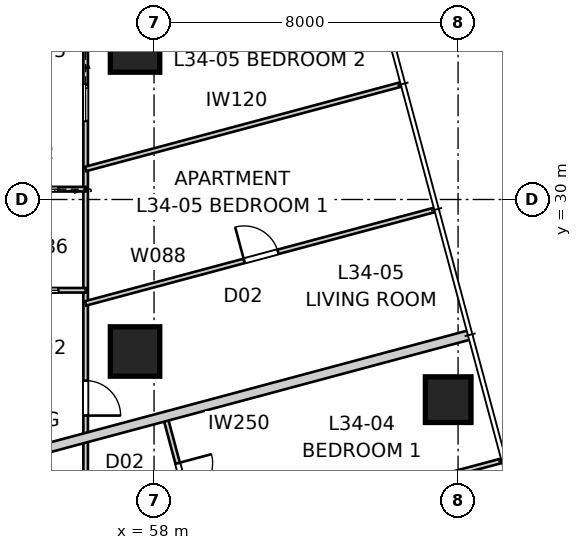
"""IFC4 building model, lengths in metres.
Left out: names, types, materials, properties, quantities, classifications, styles, units other than length and angle.
Written with IfcOpenShell. Run it as: python <this file> out.ifc"""

import sys

from ifc_helpers import new_model, si_unit, direction, frame, frame_2d, origin, origin_2d, place, context, subcontext, project, spatial, rectangle, extrude, element, fill, save


model = new_model("IFC4")
c1 = context("Model", 3, precision=1e-05, world=origin(), true_north=direction((0.0, 1.0)))
c2 = subcontext(c1, "Body", "Model", "MODEL_VIEW")
j1 = project(units=[si_unit("LENGTHUNIT", "METRE"), si_unit("PLANEANGLEUNIT", "RADIAN")], contexts=[c1])
p1 = place(None, origin())
s1 = spatial("IfcSite", under=j1, at=p1, CompositionType="ELEMENT")
p2 = place(p1, origin())
s2 = spatial("IfcBuilding", under=s1, at=p2, CompositionType="ELEMENT")
p3 = place(p2, frame((0.0, 0.0, 125.2)))
s3 = spatial("IfcBuildingStorey", under=s2, at=p3, CompositionType="ELEMENT", Elevation=125.2)
p4 = place(p3, frame((65.74, 24.733, 0.0), z_axis=(0.0, 0.0, 1.0), x_axis=(1.0, 0.0, 0.0)))
e1 = element("IfcColumn", 1, at=p4, inside=s3, PredefinedType="COLUMN", context=c2, shape_type="SweptSolid", body=[
    extrude(rectangle(XDim=1.2, YDim=1.2, at=origin_2d()), origin(), (0.0, 0.0, 1.0), 3.4),
])
for number, where, z_axis, x_axis in (
    (2, (57.5, 26.0, 0.0), (0.0, 0.0, 1.0), (1.0, 0.0, 0.0)),
    (3, (57.5, 34.0, 0.0), (0.0, 0.0, 1.0), (1.0, 0.0, 0.0)),
):
    element("IfcColumn", number, at=place(p3, frame(where, z_axis=z_axis, x_axis=x_axis)), inside=s3, PredefinedType="COLUMN", context=c2, shape_type="SweptSolid", body=[
        extrude(rectangle(XDim=1.3, YDim=1.3, at=origin_2d()), origin(), (0.0, 0.0, 1.0), 3.4),
    ])
p5 = place(p3, frame((63.665, 36.341, 0.0), z_axis=(0.0, 0.0, 1.0), x_axis=(-0.965927365002, -0.258813302479, 0.0)))
e4 = element("IfcWall", 4, at=p5, inside=s3, PredefinedType="PARTITIONING", context=c2, shape_type="SweptSolid", body=[
    extrude(rectangle(XDim=10.22, YDim=0.25, at=frame_2d((5.11, 0.0))), origin(), (0.0, 0.0, 1.0), 3.25),
])
p6 = place(p3, frame((66.318, 26.44, 0.0), z_axis=(0.0, 0.0, 1.0), x_axis=(-0.965924854576, -0.258822671559, 0.0)))
e5 = element("IfcWall", 5, at=p6, inside=s3, PredefinedType="PARTITIONING", context=c2, shape_type="SweptSolid", body=[
    extrude(rectangle(XDim=12.966, YDim=0.25, at=frame_2d((6.483, 0.0))), origin(), (0.0, 0.0, 1.0), 3.25),
])
p7 = place(p3, frame((56.2, 46.2, 0.0), z_axis=(0.0, 0.0, 1.0), x_axis=(0.0, -1.0, 0.0)))
e6 = element("IfcWall", 6, at=p7, inside=s3, PredefinedType="PARTITIONING", context=c2, shape_type="SweptSolid", body=[
    extrude(rectangle(XDim=33.2, YDim=0.12, at=frame_2d((16.6, 0.0))), origin(), (0.0, 0.0, 1.0), 2.55),
])
p8 = place(p7, frame((23.955, 0.0, 0.0)))
e7 = element("IfcOpeningElement", 7, at=p8, cuts=e6, PredefinedType="OPENING", context=c2, shape_type="SweptSolid", body=[
    extrude(rectangle(XDim=0.92, YDim=2.34, at=frame_2d((0.46, 1.17))), frame((0.0, 0.07, 0.0), z_axis=(0.0, -1.0, 0.0), x_axis=(1.0, 0.0, 0.0)), (0.0, 0.0, 1.0), 0.14),
])
p9 = place(p7, frame((20.966, 0.0, 0.0)))
e8 = element("IfcOpeningElement", 8, at=p9, cuts=e6, PredefinedType="OPENING", context=c2, shape_type="SweptSolid", body=[
    extrude(rectangle(XDim=0.92, YDim=2.34, at=frame_2d((0.46, 1.17))), frame((0.0, 0.07, 0.0), z_axis=(0.0, -1.0, 0.0), x_axis=(1.0, 0.0, 0.0)), (0.0, 0.0, 1.0), 0.14),
])
p10 = place(p7, frame((13.174, 0.0, 0.0)))
e9 = element("IfcOpeningElement", 9, at=p10, cuts=e6, PredefinedType="OPENING", context=c2, shape_type="SweptSolid", body=[
    extrude(rectangle(XDim=0.96, YDim=2.1, at=frame_2d((0.48, 1.05))), frame((0.0, 0.07, 0.0), z_axis=(0.0, -1.0, 0.0), x_axis=(1.0, 0.0, 0.0)), (0.0, 0.0, 1.0), 0.14),
])
p11 = place(p3, frame((58.292, 24.29, 0.0), z_axis=(0.0, 0.0, 1.0), x_axis=(0.258809899302, -0.965928276853, 0.0)))
e10 = element("IfcWall", 10, at=p11, inside=s3, PredefinedType="PARTITIONING", context=c2, shape_type="SweptSolid", body=[
    extrude(rectangle(XDim=6.833, YDim=0.12, at=frame_2d((3.417, 0.0))), origin(), (0.0, 0.0, 1.0), 3.25),
])
p12 = place(p11, frame((1.273, 0.0, 0.0)))
e11 = element("IfcOpeningElement", 11, at=p12, cuts=e10, PredefinedType="OPENING", context=c2, shape_type="SweptSolid", body=[
    extrude(rectangle(XDim=0.92, YDim=2.34, at=frame_2d((0.46, 1.17))), frame((0.0, 0.07, 0.0), z_axis=(0.0, -1.0, 0.0), x_axis=(1.0, 0.0, 0.0)), (0.0, 0.0, 1.0), 0.14),
])
p13 = place(p11, frame((4.64, 0.0, 0.0)))
e12 = element("IfcOpeningElement", 12, at=p13, cuts=e10, PredefinedType="OPENING", context=c2, shape_type="SweptSolid", body=[
    extrude(rectangle(XDim=0.92, YDim=2.34, at=frame_2d((0.46, 1.17))), frame((0.0, 0.07, 0.0), z_axis=(0.0, -1.0, 0.0), x_axis=(1.0, 0.0, 0.0)), (0.0, 0.0, 1.0), 0.14),
])
p14 = place(p3, frame((67.164, 23.13, 0.0), z_axis=(0.0, 0.0, 1.0), x_axis=(-0.965929470378, -0.258805444794, 0.0)))
e13 = element("IfcWall", 13, at=p14, inside=s3, PredefinedType="PARTITIONING", context=c2, shape_type="SweptSolid", body=[
    extrude(rectangle(XDim=8.269, YDim=0.12, at=frame_2d((4.135, 0.0))), origin(), (0.0, 0.0, 1.0), 2.722),
])
p15 = place(p3, frame((53.8, 27.611, 0.0), z_axis=(0.0, 0.0, 1.0), x_axis=(1.0, 0.0, 0.0)))
e14 = element("IfcWall", 14, at=p15, inside=s3, PredefinedType="PARTITIONING", context=c2, shape_type="SweptSolid", body=[
    extrude(rectangle(XDim=2.4, YDim=0.12, at=frame_2d((1.2, 0.0))), origin(), (0.0, 0.0, 1.0), 3.25),
])
p16 = place(p15, frame((0.72, 0.0, 0.0)))
e15 = element("IfcOpeningElement", 15, at=p16, cuts=e14, PredefinedType="OPENING", context=c2, shape_type="SweptSolid", body=[
    extrude(rectangle(XDim=0.96, YDim=2.1, at=frame_2d((0.48, 1.05))), frame((0.0, 0.07, 0.0), z_axis=(0.0, -1.0, 0.0), x_axis=(1.0, 0.0, 0.0)), (0.0, 0.0, 1.0), 0.14),
])
p17 = place(p3, frame((56.2, 30.272, 0.0), z_axis=(0.0, 0.0, 1.0), x_axis=(-1.0, 0.0, 0.0)))
e16 = element("IfcWall", 16, at=p17, inside=s3, PredefinedType="PARTITIONING", context=c2, shape_type="SweptSolid", body=[
    extrude(rectangle(XDim=2.4, YDim=0.12, at=frame_2d((1.2, 0.0))), origin(), (0.0, 0.0, 1.0), 3.25),
])
p18 = place(p17, frame((0.72, 0.0, 0.0)))
e17 = element("IfcOpeningElement", 17, at=p18, cuts=e16, PredefinedType="OPENING", context=c2, shape_type="SweptSolid", body=[
    extrude(rectangle(XDim=0.96, YDim=2.1, at=frame_2d((0.48, 1.05))), frame((0.0, 0.07, 0.0), z_axis=(0.0, -1.0, 0.0), x_axis=(1.0, 0.0, 0.0)), (0.0, 0.0, 1.0), 0.14),
])
p19 = place(p3, frame((56.2, 27.266, 0.0), z_axis=(0.0, 0.0, 1.0), x_axis=(0.965926072385, 0.25881812666, 0.0)))
e18 = element("IfcWall", 18, at=p19, inside=s3, PredefinedType="PARTITIONING", context=c2, shape_type="SweptSolid", body=[
    extrude(rectangle(XDim=9.52, YDim=0.12, at=frame_2d((4.76, 0.0))), origin(), (0.0, 0.0, 1.0), 3.25),
])
p20 = place(p19, frame((4.32, 0.0, 0.0)))
e19 = element("IfcOpeningElement", 19, at=p20, cuts=e18, PredefinedType="OPENING", context=c2, shape_type="SweptSolid", body=[
    extrude(rectangle(XDim=0.92, YDim=2.34, at=frame_2d((0.46, 1.17))), frame((0.0, 0.07, 0.0), z_axis=(0.0, -1.0, 0.0), x_axis=(1.0, 0.0, 0.0)), (0.0, 0.0, 1.0), 0.14),
])
p21 = place(p3, frame((56.2, 30.803, 0.0), z_axis=(0.0, 0.0, 1.0), x_axis=(0.965920565748, 0.258838676912, 0.0)))
e20 = element("IfcWall", 20, at=p21, inside=s3, PredefinedType="PARTITIONING", context=c2, shape_type="SweptSolid", body=[
    extrude(rectangle(XDim=8.604, YDim=0.12, at=frame_2d((4.302, 0.0))), origin(), (0.0, 0.0, 1.0), 3.25),
])
p22 = place(p9, origin())
e21 = element("IfcDoor", 21, at=p22, inside=s3, OperationType="SINGLE_SWING_RIGHT", PredefinedType="DOOR", context=c2, shape_type="SweptSolid", body=[
    extrude(rectangle(XDim=0.92, YDim=2.34, at=frame_2d((0.46, 1.17))), frame((0.0, 0.025, 0.0), z_axis=(0.0, -1.0, 0.0), x_axis=(1.0, 0.0, 0.0)), (0.0, 0.0, 1.0), 0.05),
])
fill(e8, e21)
p23 = place(p16, origin())
e22 = element("IfcDoor", 22, at=p23, inside=s3, OperationType="SLIDING_TO_LEFT", PredefinedType="DOOR", context=c2, shape_type="SweptSolid", body=[
    extrude(rectangle(XDim=0.96, YDim=2.1, at=frame_2d((0.48, 1.05))), frame((0.0, 0.025, 0.0), z_axis=(0.0, -1.0, 0.0), x_axis=(1.0, 0.0, 0.0)), (0.0, 0.0, 1.0), 0.05),
])
fill(e15, e22)
p24 = place(p12, origin())
e23 = element("IfcDoor", 23, at=p24, inside=s3, OperationType="SINGLE_SWING_LEFT", PredefinedType="DOOR", context=c2, shape_type="SweptSolid", body=[
    extrude(rectangle(XDim=0.92, YDim=2.34, at=frame_2d((0.46, 1.17))), frame((0.0, 0.025, 0.0), z_axis=(0.0, -1.0, 0.0), x_axis=(1.0, 0.0, 0.0)), (0.0, 0.0, 1.0), 0.05),
])
fill(e11, e23)
p25 = place(p20, origin())
e24 = element("IfcDoor", 24, at=p25, inside=s3, OperationType="SINGLE_SWING_LEFT", PredefinedType="DOOR", context=c2, shape_type="SweptSolid", body=[
    extrude(rectangle(XDim=0.92, YDim=2.34, at=frame_2d((0.46, 1.17))), frame((0.0, 0.025, 0.0), z_axis=(0.0, -1.0, 0.0), x_axis=(1.0, 0.0, 0.0)), (0.0, 0.0, 1.0), 0.05),
])
fill(e19, e24)
p26 = place(p18, origin())
e25 = element("IfcDoor", 25, at=p26, inside=s3, OperationType="SLIDING_TO_LEFT", PredefinedType="DOOR", context=c2, shape_type="SweptSolid", body=[
    extrude(rectangle(XDim=0.96, YDim=2.1, at=frame_2d((0.48, 1.05))), frame((0.0, 0.025, 0.0), z_axis=(0.0, -1.0, 0.0), x_axis=(1.0, 0.0, 0.0)), (0.0, 0.0, 1.0), 0.05),
])
fill(e17, e25)
p27 = place(p10, origin())
e26 = element("IfcDoor", 26, at=p27, inside=s3, OperationType="SLIDING_TO_LEFT", PredefinedType="DOOR", context=c2, shape_type="SweptSolid", body=[
    extrude(rectangle(XDim=0.96, YDim=2.1, at=frame_2d((0.48, 1.05))), frame((0.0, 0.025, 0.0), z_axis=(0.0, -1.0, 0.0), x_axis=(1.0, 0.0, 0.0)), (0.0, 0.0, 1.0), 0.05),
])
fill(e9, e26)
save(model, sys.argv[1])
